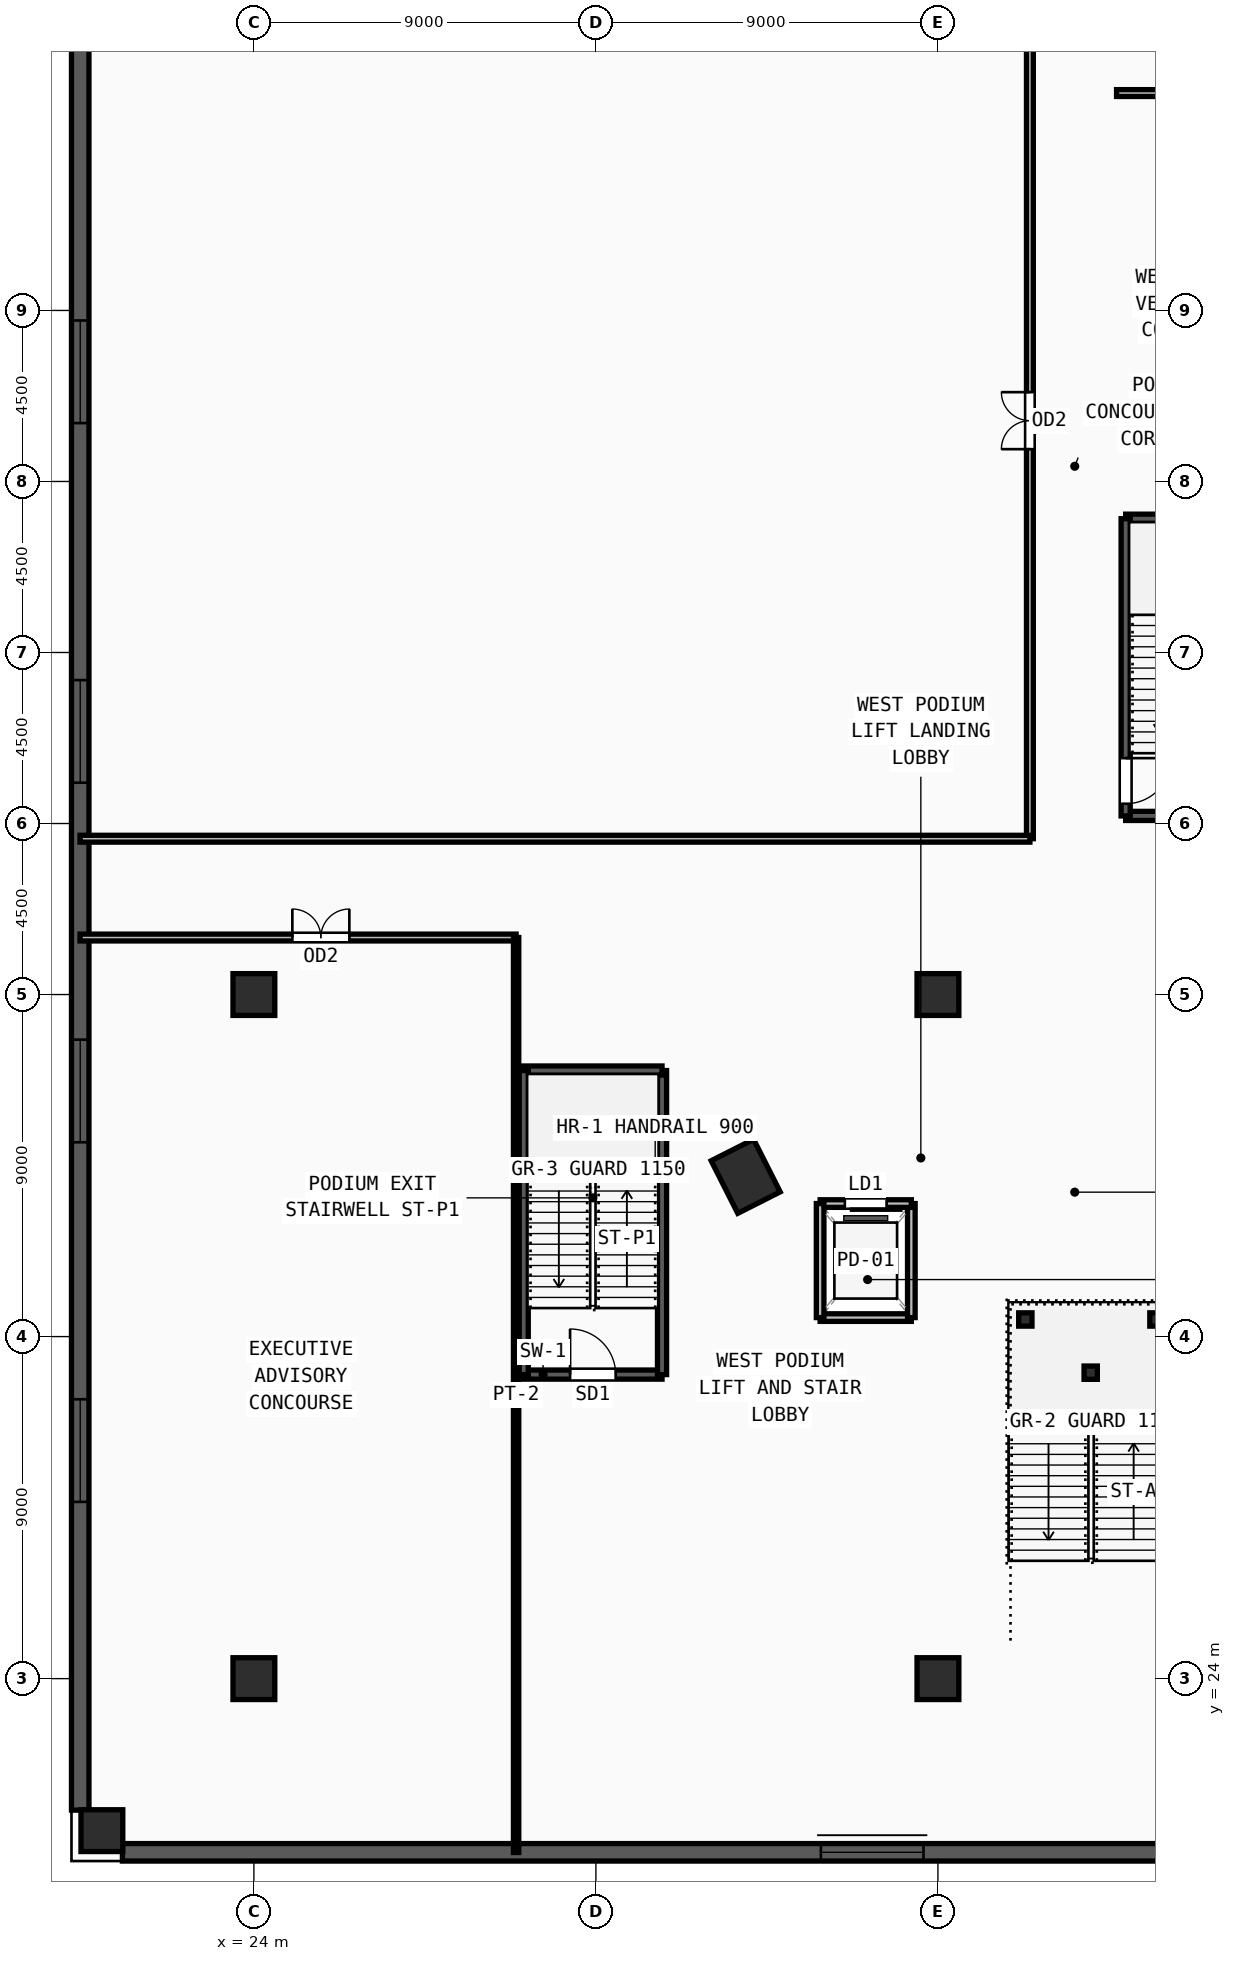
"""IFC4 building model, lengths in metres.
Left out: names, types, materials, properties, quantities, classifications, styles, units other than length and angle.
Written with IfcOpenShell. Run it as: python <this file> out.ifc"""

import sys

from ifc_helpers import new_model, si_unit, direction, frame, frame_2d, origin, origin_2d, place, context, subcontext, project, spatial, rectangle, i_section, extrude, source, transform, mapped, element, fill, save


model = new_model("IFC4")
c1 = context("Model", 3, precision=1e-05, world=origin(), true_north=direction((0.0, 1.0)))
c2 = subcontext(c1, "Body", "Model", "MODEL_VIEW")
j1 = project(units=[si_unit("LENGTHUNIT", "METRE"), si_unit("PLANEANGLEUNIT", "RADIAN")], contexts=[c1])
p1 = place(None, origin())
s1 = spatial("IfcSite", under=j1, at=p1, CompositionType="ELEMENT")
p2 = place(p1, origin())
s2 = spatial("IfcBuilding", under=s1, at=p2, CompositionType="ELEMENT")
p3 = place(p2, frame((0.0, 0.0, 14.4)))
s3 = spatial("IfcBuildingStorey", under=s2, at=p3, CompositionType="ELEMENT", Elevation=14.4)
m1 = source(origin(), c2, "Body", "SweptSolid", [
    extrude(rectangle(XDim=1.55, YDim=1.25, at=origin_2d()), origin(), (0.0, 0.0, 1.0), 4.5),
])
p4 = place(p3, frame((36.941, 37.217, 0.0), z_axis=(0.0, 0.0, 1.0), x_axis=(-0.451500573218, 0.892270829056, 0.0)))
e1 = element("IfcColumn", 1, at=p4, inside=s3, PredefinedType="COLUMN", context=c2, shape_type="MappedRepresentation", body=[
    mapped(m1, transform((0.0, 0.0, 0.0), x_axis=(1.0, 0.0, 0.0), y_axis=(0.0, 1.0, 0.0), z_axis=(0.0, 0.0, 1.0), scale=1.0)),
])
m2 = source(origin(), c2, "Body", "SweptSolid", [
    extrude(rectangle(XDim=1.1, YDim=1.1, at=origin_2d()), origin(), (0.0, 0.0, 1.0), 4.5),
])
for number, where, z_axis, x_axis in (
    (2, (24.0, 24.0, 0.0), (0.0, 0.0, 1.0), (1.0, 0.0, 0.0)),
    (3, (42.0, 24.0, 0.0), (0.0, 0.0, 1.0), (1.0, 0.0, 0.0)),
    (4, (24.0, 42.0, 0.0), (0.0, 0.0, 1.0), (1.0, 0.0, 0.0)),
    (5, (42.0, 42.0, 0.0), (0.0, 0.0, 1.0), (1.0, 0.0, 0.0)),
    (6, (20.0, 20.0, 0.0), (0.0, 0.0, 1.0), (1.0, 0.0, 0.0)),
):
    element("IfcColumn", number, at=place(p3, frame(where, z_axis=z_axis, x_axis=x_axis)), inside=s3, PredefinedType="COLUMN", context=c2, shape_type="MappedRepresentation", body=[
        mapped(m2, transform((0.0, 0.0, 0.0), x_axis=(1.0, 0.0, 0.0), y_axis=(0.0, 1.0, 0.0), z_axis=(0.0, 0.0, 1.0), scale=1.0)),
    ])
m3 = source(origin(), c2, "Body", "SweptSolid", [
    extrude(i_section(OverallWidth=0.35, OverallDepth=0.35, WebThickness=0.012, FlangeThickness=0.019, at=origin_2d()), origin(), (0.0, 0.0, 1.0), 4.5),
])
for number, where, z_axis, x_axis in (
    (7, (44.3, 33.45, 0.0), (0.0, 0.0, 1.0), (1.0, 0.0, 0.0)),
    (8, (47.75, 33.45, 0.0), (0.0, 0.0, 1.0), (1.0, 0.0, 0.0)),
    (9, (46.02, 32.05, 0.0), (0.0, 0.0, 1.0), (1.0, 0.0, 0.0)),
):
    element("IfcColumn", number, at=place(p3, frame(where, z_axis=z_axis, x_axis=x_axis)), inside=s3, PredefinedType="COLUMN", context=c2, shape_type="MappedRepresentation", body=[
        mapped(m3, transform((0.0, 0.0, 0.0), x_axis=(1.0, 0.0, 0.0), y_axis=(0.0, 1.0, 0.0), z_axis=(0.0, 0.0, 1.0), scale=1.0)),
    ])
p5 = place(p3, frame((19.43, 86.77, 0.0), z_axis=(0.0, 0.0, 1.0), x_axis=(0.0, -1.0, 0.0)))
e10 = element("IfcWall", 10, at=p5, inside=s3, PredefinedType="SOLIDWALL", context=c2, shape_type="SweptSolid", body=[
    extrude(rectangle(XDim=66.23, YDim=0.46, at=frame_2d((33.115, 0.0))), origin(), (0.0, 0.0, 1.0), 4.25),
])
m4 = source(origin(), c2, "Body", "SweptSolid", [
    extrude(rectangle(XDim=2.7, YDim=2.35, at=frame_2d((1.35, 1.175))), frame((0.0, 0.24, 0.0), z_axis=(0.0, -1.0, 0.0), x_axis=(1.0, 0.0, 0.0)), (0.0, 0.0, 1.0), 0.48),
])
p6 = place(p5, frame((8.111, 0.0, 0.55)))
e11 = element("IfcOpeningElement", 11, at=p6, cuts=e10, PredefinedType="OPENING", context=c2, shape_type="MappedRepresentation", body=[
    mapped(m4, transform((0.0, 0.0, 0.0), x_axis=(1.0, 0.0, 0.0), y_axis=(0.0, 1.0, 0.0), z_axis=(0.0, 0.0, 1.0), scale=1.0)),
])
p7 = place(p5, frame((27.034, 0.0, 0.55)))
e12 = element("IfcOpeningElement", 12, at=p7, cuts=e10, PredefinedType="OPENING", context=c2, shape_type="MappedRepresentation", body=[
    mapped(m4, transform((0.0, 0.0, 0.0), x_axis=(1.0, 0.0, 0.0), y_axis=(0.0, 1.0, 0.0), z_axis=(0.0, 0.0, 1.0), scale=1.0)),
])
p8 = place(p5, frame((36.496, 0.0, 0.55)))
e13 = element("IfcOpeningElement", 13, at=p8, cuts=e10, PredefinedType="OPENING", context=c2, shape_type="MappedRepresentation", body=[
    mapped(m4, transform((0.0, 0.0, 0.0), x_axis=(1.0, 0.0, 0.0), y_axis=(0.0, 1.0, 0.0), z_axis=(0.0, 0.0, 1.0), scale=1.0)),
])
p9 = place(p5, frame((45.957, 0.0, 0.55)))
e14 = element("IfcOpeningElement", 14, at=p9, cuts=e10, PredefinedType="OPENING", context=c2, shape_type="MappedRepresentation", body=[
    mapped(m4, transform((0.0, 0.0, 0.0), x_axis=(1.0, 0.0, 0.0), y_axis=(0.0, 1.0, 0.0), z_axis=(0.0, 0.0, 1.0), scale=1.0)),
])
p10 = place(p5, frame((55.419, 0.0, 0.55)))
e15 = element("IfcOpeningElement", 15, at=p10, cuts=e10, PredefinedType="OPENING", context=c2, shape_type="MappedRepresentation", body=[
    mapped(m4, transform((0.0, 0.0, 0.0), x_axis=(1.0, 0.0, 0.0), y_axis=(0.0, 1.0, 0.0), z_axis=(0.0, 0.0, 1.0), scale=1.0)),
])
p11 = place(p3, frame((20.54, 19.43, 0.0), z_axis=(0.0, 0.0, 1.0), x_axis=(1.0, 0.0, 0.0)))
e16 = element("IfcWall", 16, at=p11, inside=s3, PredefinedType="SOLIDWALL", context=c2, shape_type="SweptSolid", body=[
    extrude(rectangle(XDim=78.92, YDim=0.46, at=frame_2d((39.46, 0.0))), origin(), (0.0, 0.0, 1.0), 4.25),
])
p12 = place(p11, frame((18.38, 0.0, 0.55)))
e17 = element("IfcOpeningElement", 17, at=p12, cuts=e16, PredefinedType="OPENING", context=c2, shape_type="MappedRepresentation", body=[
    mapped(m4, transform((0.0, 0.0, 0.0), x_axis=(1.0, 0.0, 0.0), y_axis=(0.0, 1.0, 0.0), z_axis=(0.0, 0.0, 1.0), scale=1.0)),
])
p13 = place(p11, frame((57.84, 0.0, 0.55)))
e18 = element("IfcOpeningElement", 18, at=p13, cuts=e16, PredefinedType="OPENING", context=c2, shape_type="MappedRepresentation", body=[
    mapped(m4, transform((0.0, 0.0, 0.0), x_axis=(1.0, 0.0, 0.0), y_axis=(0.0, 1.0, 0.0), z_axis=(0.0, 0.0, 1.0), scale=1.0)),
])
p14 = place(p11, frame((67.705, 0.0, 0.55)))
e19 = element("IfcOpeningElement", 19, at=p14, cuts=e16, PredefinedType="OPENING", context=c2, shape_type="MappedRepresentation", body=[
    mapped(m4, transform((0.0, 0.0, 0.0), x_axis=(1.0, 0.0, 0.0), y_axis=(0.0, 1.0, 0.0), z_axis=(0.0, 0.0, 1.0), scale=1.0)),
])
for number, where, z_axis, x_axis in (
    (20, (46.94, 46.7, 0.0), (0.0, 0.0, 1.0), (1.0, 0.0, 0.0)),
    (21, (50.38, 54.52, 0.0), (0.0, 0.0, 1.0), (-1.0, 0.0, 0.0)),
):
    element("IfcWall", number, at=place(p3, frame(where, z_axis=z_axis, x_axis=x_axis)), inside=s3, PredefinedType="SOLIDWALL", context=c2, shape_type="SweptSolid", body=[
        extrude(rectangle(XDim=3.44, YDim=0.24, at=frame_2d((1.72, 0.0))), origin(), (0.0, 0.0, 1.0), 4.25),
    ])
p15 = place(p3, frame((46.94, 54.52, 0.0), z_axis=(0.0, 0.0, 1.0), x_axis=(0.0, -1.0, 0.0)))
e22 = element("IfcWall", 22, at=p15, inside=s3, PredefinedType="SOLIDWALL", context=c2, shape_type="SweptSolid", body=[
    extrude(rectangle(XDim=7.82, YDim=0.24, at=frame_2d((3.91, 0.0))), origin(), (0.0, 0.0, 1.0), 4.25),
])
m5 = source(origin(), c2, "Body", "SweptSolid", [
    extrude(rectangle(XDim=1.2, YDim=2.2, at=frame_2d((0.6, 1.1))), frame((0.0, 0.13, 0.0), z_axis=(0.0, -1.0, 0.0), x_axis=(1.0, 0.0, 0.0)), (0.0, 0.0, 1.0), 0.26),
])
p16 = place(p15, frame((6.3, 0.0, 0.0)))
e23 = element("IfcOpeningElement", 23, at=p16, cuts=e22, PredefinedType="OPENING", context=c2, shape_type="MappedRepresentation", body=[
    mapped(m5, transform((0.0, 0.0, 0.0), x_axis=(1.0, 0.0, 0.0), y_axis=(0.0, 1.0, 0.0), z_axis=(0.0, 0.0, 1.0), scale=1.0)),
])
p17 = place(p3, frame((31.1, 32.0, 0.0), z_axis=(0.0, 0.0, 1.0), x_axis=(1.0, 0.0, 0.0)))
e24 = element("IfcWall", 24, at=p17, inside=s3, PredefinedType="SOLIDWALL", context=c2, shape_type="SweptSolid", body=[
    extrude(rectangle(XDim=3.64, YDim=0.24, at=frame_2d((1.82, 0.0))), origin(), (0.0, 0.0, 1.0), 4.25),
])
p18 = place(p17, frame((1.22, 0.0, 0.0)))
e25 = element("IfcOpeningElement", 25, at=p18, cuts=e24, PredefinedType="OPENING", context=c2, shape_type="MappedRepresentation", body=[
    mapped(m5, transform((0.0, 0.0, 0.0), x_axis=(1.0, 0.0, 0.0), y_axis=(0.0, 1.0, 0.0), z_axis=(0.0, 0.0, 1.0), scale=1.0)),
])
p19 = place(p3, frame((34.74, 32.0, 0.0), z_axis=(0.0, 0.0, 1.0), x_axis=(0.0, 1.0, 0.0)))
e26 = element("IfcWall", 26, at=p19, inside=s3, PredefinedType="SOLIDWALL", context=c2, shape_type="SweptSolid", body=[
    extrude(rectangle(XDim=8.0, YDim=0.24, at=frame_2d((4.0, 0.0))), origin(), (0.0, 0.0, 1.0), 4.25),
])
p20 = place(p3, frame((34.74, 40.0, 0.0), z_axis=(0.0, 0.0, 1.0), x_axis=(-1.0, 0.0, 0.0)))
e27 = element("IfcWall", 27, at=p20, inside=s3, PredefinedType="SOLIDWALL", context=c2, shape_type="SweptSolid", body=[
    extrude(rectangle(XDim=3.64, YDim=0.24, at=frame_2d((1.82, 0.0))), origin(), (0.0, 0.0, 1.0), 4.25),
])
p21 = place(p3, frame((31.1, 40.0, 0.0), z_axis=(0.0, 0.0, 1.0), x_axis=(0.0, -1.0, 0.0)))
e28 = element("IfcWall", 28, at=p21, inside=s3, PredefinedType="SOLIDWALL", context=c2, shape_type="SweptSolid", body=[
    extrude(rectangle(XDim=8.0, YDim=0.24, at=frame_2d((4.0, 0.0))), origin(), (0.0, 0.0, 1.0), 4.25),
])
p22 = place(p3, frame((38.9, 33.5, 0.0), z_axis=(0.0, 0.0, 1.0), x_axis=(1.0, 0.0, 0.0)))
e29 = element("IfcWall", 29, at=p22, inside=s3, PredefinedType="SOLIDWALL", context=c2, shape_type="SweptSolid", body=[
    extrude(rectangle(XDim=2.4, YDim=0.2, at=frame_2d((1.2, 0.0))), origin(), (0.0, 0.0, 1.0), 4.25),
])
p23 = place(p3, frame((41.3, 33.5, 0.0), z_axis=(0.0, 0.0, 1.0), x_axis=(0.0, 1.0, 0.0)))
e30 = element("IfcWall", 30, at=p23, inside=s3, PredefinedType="SOLIDWALL", context=c2, shape_type="SweptSolid", body=[
    extrude(rectangle(XDim=3.0, YDim=0.2, at=frame_2d((1.5, 0.0))), origin(), (0.0, 0.0, 1.0), 4.25),
])
p24 = place(p3, frame((41.3, 36.5, 0.0), z_axis=(0.0, 0.0, 1.0), x_axis=(-1.0, 0.0, 0.0)))
e31 = element("IfcWall", 31, at=p24, inside=s3, PredefinedType="SOLIDWALL", context=c2, shape_type="SweptSolid", body=[
    extrude(rectangle(XDim=2.4, YDim=0.2, at=frame_2d((1.2, 0.0))), origin(), (0.0, 0.0, 1.0), 4.25),
])
m6 = source(origin(), c2, "Body", "SweptSolid", [
    extrude(rectangle(XDim=1.1, YDim=2.2, at=frame_2d((0.55, 1.1))), frame((0.0, 0.11, 0.0), z_axis=(0.0, -1.0, 0.0), x_axis=(1.0, 0.0, 0.0)), (0.0, 0.0, 1.0), 0.22),
])
p25 = place(p24, frame((0.65, 0.0, 0.0)))
e32 = element("IfcOpeningElement", 32, at=p25, cuts=e31, PredefinedType="OPENING", context=c2, shape_type="MappedRepresentation", body=[
    mapped(m6, transform((0.0, 0.0, 0.0), x_axis=(1.0, 0.0, 0.0), y_axis=(0.0, 1.0, 0.0), z_axis=(0.0, 0.0, 1.0), scale=1.0)),
])
p26 = place(p3, frame((38.9, 36.5, 0.0), z_axis=(0.0, 0.0, 1.0), x_axis=(0.0, -1.0, 0.0)))
e33 = element("IfcWall", 33, at=p26, inside=s3, PredefinedType="SOLIDWALL", context=c2, shape_type="SweptSolid", body=[
    extrude(rectangle(XDim=3.0, YDim=0.2, at=frame_2d((1.5, 0.0))), origin(), (0.0, 0.0, 1.0), 4.25),
])
p27 = place(p3, frame((46.7, 65.72, 0.0), z_axis=(0.0, 0.0, 1.0), x_axis=(1.0, 0.0, 0.0)))
e34 = element("IfcWall", 34, at=p27, inside=s3, PredefinedType="PARTITIONING", context=c2, shape_type="SweptSolid", body=[
    extrude(rectangle(XDim=3.84, YDim=0.18, at=frame_2d((1.92, 0.0))), origin(), (0.0, 0.0, 1.0), 4.25),
])
m7 = source(origin(), c2, "Body", "SweptSolid", [
    extrude(rectangle(XDim=1.3, YDim=2.2, at=frame_2d((0.65, 1.1))), frame((0.0, 0.1, 0.0), z_axis=(0.0, -1.0, 0.0), x_axis=(1.0, 0.0, 0.0)), (0.0, 0.0, 1.0), 0.2),
])
p28 = place(p27, frame((1.27, 0.0, 0.0)))
e35 = element("IfcOpeningElement", 35, at=p28, cuts=e34, PredefinedType="OPENING", context=c2, shape_type="MappedRepresentation", body=[
    mapped(m7, transform((0.0, 0.0, 0.0), x_axis=(1.0, 0.0, 0.0), y_axis=(0.0, 1.0, 0.0), z_axis=(0.0, 0.0, 1.0), scale=1.0)),
])
p29 = place(p3, frame((19.425, 43.5, 0.0), z_axis=(0.0, 0.0, 1.0), x_axis=(1.0, 0.0, 0.0)))
e36 = element("IfcWall", 36, at=p29, inside=s3, PredefinedType="PARTITIONING", context=c2, shape_type="SweptSolid", body=[
    extrude(rectangle(XDim=11.475, YDim=0.18, at=frame_2d((5.737, 0.0))), origin(), (0.0, 0.0, 1.0), 4.25),
])
m8 = source(origin(), c2, "Body", "SweptSolid", [
    extrude(rectangle(XDim=1.5, YDim=2.2, at=frame_2d((0.75, 1.1))), frame((0.0, 0.1, 0.0), z_axis=(0.0, -1.0, 0.0), x_axis=(1.0, 0.0, 0.0)), (0.0, 0.0, 1.0), 0.2),
])
p30 = place(p29, frame((5.587, 0.0, 0.0)))
e37 = element("IfcOpeningElement", 37, at=p30, cuts=e36, PredefinedType="OPENING", context=c2, shape_type="MappedRepresentation", body=[
    mapped(m8, transform((0.0, 0.0, 0.0), x_axis=(1.0, 0.0, 0.0), y_axis=(0.0, 1.0, 0.0), z_axis=(0.0, 0.0, 1.0), scale=1.0)),
])
p31 = place(p3, frame((44.42, 46.1, 0.0), z_axis=(0.0, 0.0, 1.0), x_axis=(0.0, 1.0, 0.0)))
e38 = element("IfcWall", 38, at=p31, inside=s3, PredefinedType="PARTITIONING", context=c2, shape_type="SweptSolid", body=[
    extrude(rectangle(XDim=22.0, YDim=0.18, at=frame_2d((11.0, 0.0))), origin(), (0.0, 0.0, 1.0), 4.25),
])
p32 = place(p31, frame((10.25, 0.0, 0.0)))
e39 = element("IfcOpeningElement", 39, at=p32, cuts=e38, PredefinedType="OPENING", context=c2, shape_type="MappedRepresentation", body=[
    mapped(m8, transform((0.0, 0.0, 0.0), x_axis=(1.0, 0.0, 0.0), y_axis=(0.0, 1.0, 0.0), z_axis=(0.0, 0.0, 1.0), scale=1.0)),
])
p33 = place(p3, frame((19.425, 46.1, 0.0), z_axis=(0.0, 0.0, 1.0), x_axis=(1.0, 0.0, 0.0)))
e40 = element("IfcWall", 40, at=p33, inside=s3, PredefinedType="PARTITIONING", context=c2, shape_type="SweptSolid", body=[
    extrude(rectangle(XDim=24.995, YDim=0.18, at=frame_2d((12.498, 0.0))), origin(), (0.0, 0.0, 1.0), 4.25),
])
p34 = place(p3, frame((30.9, 19.425, 0.0), z_axis=(0.0, 0.0, 1.0), x_axis=(0.0, 1.0, 0.0)))
e41 = element("IfcWall", 41, at=p34, inside=s3, PredefinedType="PARTITIONING", context=c2, shape_type="SweptSolid", body=[
    extrude(rectangle(XDim=24.075, YDim=0.14, at=frame_2d((12.038, 0.0))), origin(), (0.0, 0.0, 1.0), 4.25),
])
m9 = source(origin(), c2, "Body", "SweptSolid", [
    extrude(rectangle(XDim=2.7, YDim=2.35, at=frame_2d((1.35, 1.175))), frame((0.0, 0.03, 0.0), z_axis=(0.0, -1.0, 0.0), x_axis=(1.0, 0.0, 0.0)), (0.0, 0.0, 1.0), 0.06),
])
p35 = place(p7, origin())
e42 = element("IfcWindow", 42, at=p35, inside=s3, PartitioningType="TRIPLE_PANEL_VERTICAL", PredefinedType="WINDOW", context=c2, shape_type="MappedRepresentation", body=[
    mapped(m9, transform((0.0, 0.0, 0.0), x_axis=(1.0, 0.0, 0.0), y_axis=(0.0, 1.0, 0.0), z_axis=(0.0, 0.0, 1.0), scale=1.0)),
])
fill(e12, e42)
p36 = place(p8, origin())
e43 = element("IfcWindow", 43, at=p36, inside=s3, PartitioningType="TRIPLE_PANEL_VERTICAL", PredefinedType="WINDOW", context=c2, shape_type="MappedRepresentation", body=[
    mapped(m9, transform((0.0, 0.0, 0.0), x_axis=(1.0, 0.0, 0.0), y_axis=(0.0, 1.0, 0.0), z_axis=(0.0, 0.0, 1.0), scale=1.0)),
])
fill(e13, e43)
p37 = place(p9, origin())
e44 = element("IfcWindow", 44, at=p37, inside=s3, PartitioningType="TRIPLE_PANEL_VERTICAL", PredefinedType="WINDOW", context=c2, shape_type="MappedRepresentation", body=[
    mapped(m9, transform((0.0, 0.0, 0.0), x_axis=(1.0, 0.0, 0.0), y_axis=(0.0, 1.0, 0.0), z_axis=(0.0, 0.0, 1.0), scale=1.0)),
])
fill(e14, e44)
p38 = place(p10, origin())
e45 = element("IfcWindow", 45, at=p38, inside=s3, PartitioningType="TRIPLE_PANEL_VERTICAL", PredefinedType="WINDOW", context=c2, shape_type="MappedRepresentation", body=[
    mapped(m9, transform((0.0, 0.0, 0.0), x_axis=(1.0, 0.0, 0.0), y_axis=(0.0, 1.0, 0.0), z_axis=(0.0, 0.0, 1.0), scale=1.0)),
])
fill(e15, e45)
p39 = place(p12, origin())
e46 = element("IfcWindow", 46, at=p39, inside=s3, PartitioningType="TRIPLE_PANEL_VERTICAL", PredefinedType="WINDOW", context=c2, shape_type="MappedRepresentation", body=[
    mapped(m9, transform((0.0, 0.0, 0.0), x_axis=(1.0, 0.0, 0.0), y_axis=(0.0, 1.0, 0.0), z_axis=(0.0, 0.0, 1.0), scale=1.0)),
])
fill(e17, e46)
m10 = source(origin(), c2, "Body", "SweptSolid", [
    extrude(rectangle(XDim=1.2, YDim=2.2, at=frame_2d((0.6, 1.1))), frame((0.0, 0.025, 0.0), z_axis=(0.0, -1.0, 0.0), x_axis=(1.0, 0.0, 0.0)), (0.0, 0.0, 1.0), 0.05),
])
p40 = place(p16, origin())
e47 = element("IfcDoor", 47, at=p40, inside=s3, OperationType="SINGLE_SWING_LEFT", PredefinedType="DOOR", context=c2, shape_type="MappedRepresentation", body=[
    mapped(m10, transform((0.0, 0.0, 0.0), x_axis=(1.0, 0.0, 0.0), y_axis=(0.0, 1.0, 0.0), z_axis=(0.0, 0.0, 1.0), scale=1.0)),
])
fill(e23, e47)
p41 = place(p18, origin())
e48 = element("IfcDoor", 48, at=p41, inside=s3, OperationType="SINGLE_SWING_LEFT", PredefinedType="DOOR", context=c2, shape_type="MappedRepresentation", body=[
    mapped(m10, transform((0.0, 0.0, 0.0), x_axis=(1.0, 0.0, 0.0), y_axis=(0.0, 1.0, 0.0), z_axis=(0.0, 0.0, 1.0), scale=1.0)),
])
fill(e25, e48)
m11 = source(origin(), c2, "Body", "SweptSolid", [
    extrude(rectangle(XDim=1.1, YDim=2.2, at=frame_2d((0.55, 1.1))), frame((0.0, 0.025, 0.0), z_axis=(0.0, -1.0, 0.0), x_axis=(1.0, 0.0, 0.0)), (0.0, 0.0, 1.0), 0.05),
])
p42 = place(p25, origin())
e49 = element("IfcDoor", 49, at=p42, inside=s3, OperationType="SLIDING_TO_LEFT", PredefinedType="DOOR", context=c2, shape_type="MappedRepresentation", body=[
    mapped(m11, transform((0.0, 0.0, 0.0), x_axis=(1.0, 0.0, 0.0), y_axis=(0.0, 1.0, 0.0), z_axis=(0.0, 0.0, 1.0), scale=1.0)),
])
fill(e32, e49)
m12 = source(origin(), c2, "Body", "SweptSolid", [
    extrude(rectangle(XDim=1.5, YDim=2.2, at=frame_2d((0.75, 1.1))), frame((0.0, 0.025, 0.0), z_axis=(0.0, -1.0, 0.0), x_axis=(1.0, 0.0, 0.0)), (0.0, 0.0, 1.0), 0.05),
])
p43 = place(p30, origin())
e50 = element("IfcDoor", 50, at=p43, inside=s3, OperationType="DOUBLE_DOOR_SINGLE_SWING", PredefinedType="DOOR", context=c2, shape_type="MappedRepresentation", body=[
    mapped(m12, transform((0.0, 0.0, 0.0), x_axis=(1.0, 0.0, 0.0), y_axis=(0.0, 1.0, 0.0), z_axis=(0.0, 0.0, 1.0), scale=1.0)),
])
fill(e37, e50)
p44 = place(p32, origin())
e51 = element("IfcDoor", 51, at=p44, inside=s3, OperationType="DOUBLE_DOOR_SINGLE_SWING", PredefinedType="DOOR", context=c2, shape_type="MappedRepresentation", body=[
    mapped(m12, transform((0.0, 0.0, 0.0), x_axis=(1.0, 0.0, 0.0), y_axis=(0.0, 1.0, 0.0), z_axis=(0.0, 0.0, 1.0), scale=1.0)),
])
fill(e39, e51)
save(model, sys.argv[1])
